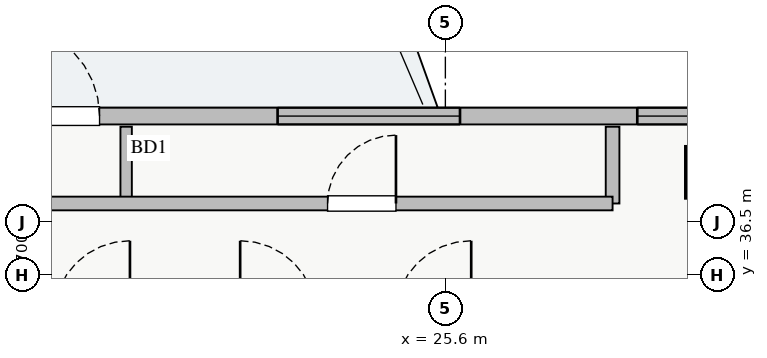
"""IFC4 building model, lengths in metres.
Left out: names, types, materials, properties, quantities, classifications, styles, units other than length and angle.
Written with IfcOpenShell. Run it as: python <this file> out.ifc"""

import sys

from ifc_helpers import new_model, si_unit, direction, frame, frame_2d, origin, origin_2d, place, context, subcontext, project, spatial, rectangle, extrude, source, transform, mapped, element, fill, save


model = new_model("IFC4")
c1 = context("Model", 3, precision=1e-05, world=origin(), true_north=direction((0.0, 1.0)))
c2 = subcontext(c1, "Body", "Model", "MODEL_VIEW")
j1 = project(units=[si_unit("LENGTHUNIT", "METRE"), si_unit("PLANEANGLEUNIT", "RADIAN")], contexts=[c1])
p1 = place(None, origin())
s1 = spatial("IfcSite", under=j1, at=p1, CompositionType="ELEMENT")
p2 = place(p1, origin())
s2 = spatial("IfcBuilding", under=s1, at=p2, CompositionType="ELEMENT")
p3 = place(p2, frame((0.0, 0.0, 260.0)))
s3 = spatial("IfcBuildingStorey", under=s2, at=p3, CompositionType="ELEMENT", Elevation=260.0)
m1 = source(origin(), c2, "Body", "SweptSolid", [
    extrude(rectangle(XDim=0.65, YDim=0.65, at=origin_2d()), origin(), (0.0, 0.0, 1.0), 3.25),
])
p4 = place(p3, frame((29.1, 37.85, 0.0), z_axis=(0.0, 0.0, 1.0), x_axis=(1.0, 0.0, 0.0)))
e1 = element("IfcColumn", 1, at=p4, inside=s3, PredefinedType="COLUMN", context=c2, shape_type="MappedRepresentation", body=[
    mapped(m1, transform((0.0, 0.0, 0.0), x_axis=(1.0, 0.0, 0.0), y_axis=(0.0, 1.0, 0.0), z_axis=(0.0, 0.0, 1.0), scale=1.0)),
])
p5 = place(p3, frame((8.35, 38.59, 0.0), z_axis=(0.0, 0.0, 1.0), x_axis=(1.0, 0.0, 0.0)))
e2 = element("IfcWall", 2, at=p5, inside=s3, PredefinedType="STANDARD", context=c2, shape_type="SweptSolid", body=[
    extrude(rectangle(XDim=21.3, YDim=0.22, at=frame_2d((10.65, 0.0))), origin(), (0.0, 0.0, 1.0), 2.57),
])
p6 = place(p5, frame((11.5, 0.0, 0.0)))
e3 = element("IfcOpeningElement", 3, at=p6, cuts=e2, PredefinedType="OPENING", context=c2, shape_type="SweptSolid", body=[
    extrude(rectangle(XDim=1.2, YDim=2.1, at=frame_2d((0.6, 1.05))), frame((0.0, 0.12, 0.0), z_axis=(0.0, -1.0, 0.0), x_axis=(1.0, 0.0, 0.0)), (0.0, 0.0, 1.0), 0.24),
])
p7 = place(p5, frame((1.463, 0.0, 0.9)))
e4 = element("IfcOpeningElement", 4, at=p7, cuts=e2, PredefinedType="OPENING", context=c2, shape_type="SweptSolid", body=[
    extrude(rectangle(XDim=2.4, YDim=1.48, at=frame_2d((1.2, 0.74))), frame((0.0, 0.12, 0.0), z_axis=(0.0, -1.0, 0.0), x_axis=(1.0, 0.0, 0.0)), (0.0, 0.0, 1.0), 0.24),
])
p8 = place(p5, frame((7.088, 0.0, 0.9)))
e5 = element("IfcOpeningElement", 5, at=p8, cuts=e2, PredefinedType="OPENING", context=c2, shape_type="SweptSolid", body=[
    extrude(rectangle(XDim=1.8, YDim=1.45, at=frame_2d((0.9, 0.725))), frame((0.0, 0.12, 0.0), z_axis=(0.0, -1.0, 0.0), x_axis=(1.0, 0.0, 0.0)), (0.0, 0.0, 1.0), 0.24),
])
p9 = place(p5, frame((19.775, 0.0, 0.9)))
e6 = element("IfcOpeningElement", 6, at=p9, cuts=e2, PredefinedType="OPENING", context=c2, shape_type="SweptSolid", body=[
    extrude(rectangle(XDim=1.2, YDim=1.4, at=frame_2d((0.6, 0.7))), frame((0.0, 0.12, 0.0), z_axis=(0.0, -1.0, 0.0), x_axis=(1.0, 0.0, 0.0)), (0.0, 0.0, 1.0), 0.24),
])
p10 = place(p5, frame((15.042, 0.0, 0.9)))
e7 = element("IfcOpeningElement", 7, at=p10, cuts=e2, PredefinedType="OPENING", context=c2, shape_type="SweptSolid", body=[
    extrude(rectangle(XDim=2.4, YDim=1.5, at=frame_2d((1.2, 0.75))), frame((0.0, 0.12, 0.0), z_axis=(0.0, -1.0, 0.0), x_axis=(1.0, 0.0, 0.0)), (0.0, 0.0, 1.0), 0.24),
])
p11 = place(p3, frame((27.8, 37.44, 0.0), z_axis=(0.0, 0.0, 1.0), x_axis=(0.0, 1.0, 0.0)))
e8 = element("IfcWall", 8, at=p11, inside=s3, PredefinedType="PARTITIONING", context=c2, shape_type="SweptSolid", body=[
    extrude(rectangle(XDim=1.01, YDim=0.18, at=frame_2d((0.505, 0.0))), origin(), (0.0, 0.0, 1.0), 3.03),
])
p12 = place(p3, frame((21.4, 37.44, 0.0), z_axis=(0.0, 0.0, 1.0), x_axis=(0.0, 1.0, 0.0)))
e9 = element("IfcWall", 9, at=p12, inside=s3, PredefinedType="PARTITIONING", context=c2, shape_type="SweptSolid", body=[
    extrude(rectangle(XDim=1.01, YDim=0.15, at=frame_2d((0.505, 0.0))), origin(), (0.0, 0.0, 1.0), 3.03),
])
p13 = place(p3, frame((8.85, 37.44, 0.0), z_axis=(0.0, 0.0, 1.0), x_axis=(1.0, 0.0, 0.0)))
e10 = element("IfcWall", 10, at=p13, inside=s3, PredefinedType="PARTITIONING", context=c2, shape_type="SweptSolid", body=[
    extrude(rectangle(XDim=18.95, YDim=0.18, at=frame_2d((9.475, 0.0))), origin(), (0.0, 0.0, 1.0), 3.03),
])
p14 = place(p13, frame((2.8, 0.0, 0.0)))
e11 = element("IfcOpeningElement", 11, at=p14, cuts=e10, PredefinedType="OPENING", context=c2, shape_type="SweptSolid", body=[
    extrude(rectangle(XDim=0.9, YDim=2.05, at=frame_2d((0.45, 1.025))), frame((0.0, 0.1, 0.0), z_axis=(0.0, -1.0, 0.0), x_axis=(1.0, 0.0, 0.0)), (0.0, 0.0, 1.0), 0.2),
])
p15 = place(p13, frame((8.8, 0.0, 0.0)))
e12 = element("IfcOpeningElement", 12, at=p15, cuts=e10, PredefinedType="OPENING", context=c2, shape_type="SweptSolid", body=[
    extrude(rectangle(XDim=0.9, YDim=2.05, at=frame_2d((0.45, 1.025))), frame((0.0, 0.1, 0.0), z_axis=(0.0, -1.0, 0.0), x_axis=(1.0, 0.0, 0.0)), (0.0, 0.0, 1.0), 0.2),
])
p16 = place(p13, frame((15.2, 0.0, 0.0)))
e13 = element("IfcOpeningElement", 13, at=p16, cuts=e10, PredefinedType="OPENING", context=c2, shape_type="SweptSolid", body=[
    extrude(rectangle(XDim=0.9, YDim=2.05, at=frame_2d((0.45, 1.025))), frame((0.0, 0.1, 0.0), z_axis=(0.0, -1.0, 0.0), x_axis=(1.0, 0.0, 0.0)), (0.0, 0.0, 1.0), 0.2),
])
m2 = source(origin(), c2, "Body", "SweptSolid", [
    extrude(rectangle(XDim=1.2, YDim=2.1, at=frame_2d((0.6, 1.05))), frame((0.0, 0.025, 0.0), z_axis=(0.0, -1.0, 0.0), x_axis=(1.0, 0.0, 0.0)), (0.0, 0.0, 1.0), 0.05),
])
p17 = place(p6, origin())
e14 = element("IfcDoor", 14, at=p17, inside=s3, OperationType="SINGLE_SWING_LEFT", PredefinedType="DOOR", context=c2, shape_type="MappedRepresentation", body=[
    mapped(m2, transform((0.0, 0.0, 0.0), x_axis=(1.0, 0.0, 0.0), y_axis=(0.0, 1.0, 0.0), z_axis=(0.0, 0.0, 1.0), scale=1.0)),
])
fill(e3, e14)
m3 = source(origin(), c2, "Body", "SweptSolid", [
    extrude(rectangle(XDim=1.2, YDim=1.4, at=frame_2d((0.6, 0.7))), frame((0.0, 0.03, 0.0), z_axis=(0.0, -1.0, 0.0), x_axis=(1.0, 0.0, 0.0)), (0.0, 0.0, 1.0), 0.06),
])
p18 = place(p9, origin())
e15 = element("IfcWindow", 15, at=p18, inside=s3, PartitioningType="TRIPLE_PANEL_VERTICAL", PredefinedType="WINDOW", context=c2, shape_type="MappedRepresentation", body=[
    mapped(m3, transform((0.0, 0.0, 0.0), x_axis=(1.0, 0.0, 0.0), y_axis=(0.0, 1.0, 0.0), z_axis=(0.0, 0.0, 1.0), scale=1.0)),
])
fill(e6, e15)
m4 = source(origin(), c2, "Body", "SweptSolid", [
    extrude(rectangle(XDim=0.9, YDim=2.05, at=frame_2d((0.45, 1.025))), frame((0.0, 0.025, 0.0), z_axis=(0.0, -1.0, 0.0), x_axis=(1.0, 0.0, 0.0)), (0.0, 0.0, 1.0), 0.05),
])
p19 = place(p16, origin())
e16 = element("IfcDoor", 16, at=p19, inside=s3, OperationType="SINGLE_SWING_RIGHT", PredefinedType="DOOR", context=c2, shape_type="MappedRepresentation", body=[
    mapped(m4, transform((0.0, 0.0, 0.0), x_axis=(1.0, 0.0, 0.0), y_axis=(0.0, 1.0, 0.0), z_axis=(0.0, 0.0, 1.0), scale=1.0)),
])
fill(e13, e16)
m5 = source(origin(), c2, "Body", "SweptSolid", [
    extrude(rectangle(XDim=2.4, YDim=1.5, at=frame_2d((1.2, 0.75))), frame((0.0, 0.03, 0.0), z_axis=(0.0, -1.0, 0.0), x_axis=(1.0, 0.0, 0.0)), (0.0, 0.0, 1.0), 0.06),
])
p20 = place(p10, origin())
e17 = element("IfcWindow", 17, at=p20, inside=s3, PartitioningType="TRIPLE_PANEL_VERTICAL", PredefinedType="WINDOW", context=c2, shape_type="MappedRepresentation", body=[
    mapped(m5, transform((0.0, 0.0, 0.0), x_axis=(1.0, 0.0, 0.0), y_axis=(0.0, 1.0, 0.0), z_axis=(0.0, 0.0, 1.0), scale=1.0)),
])
fill(e7, e17)
save(model, sys.argv[1])
